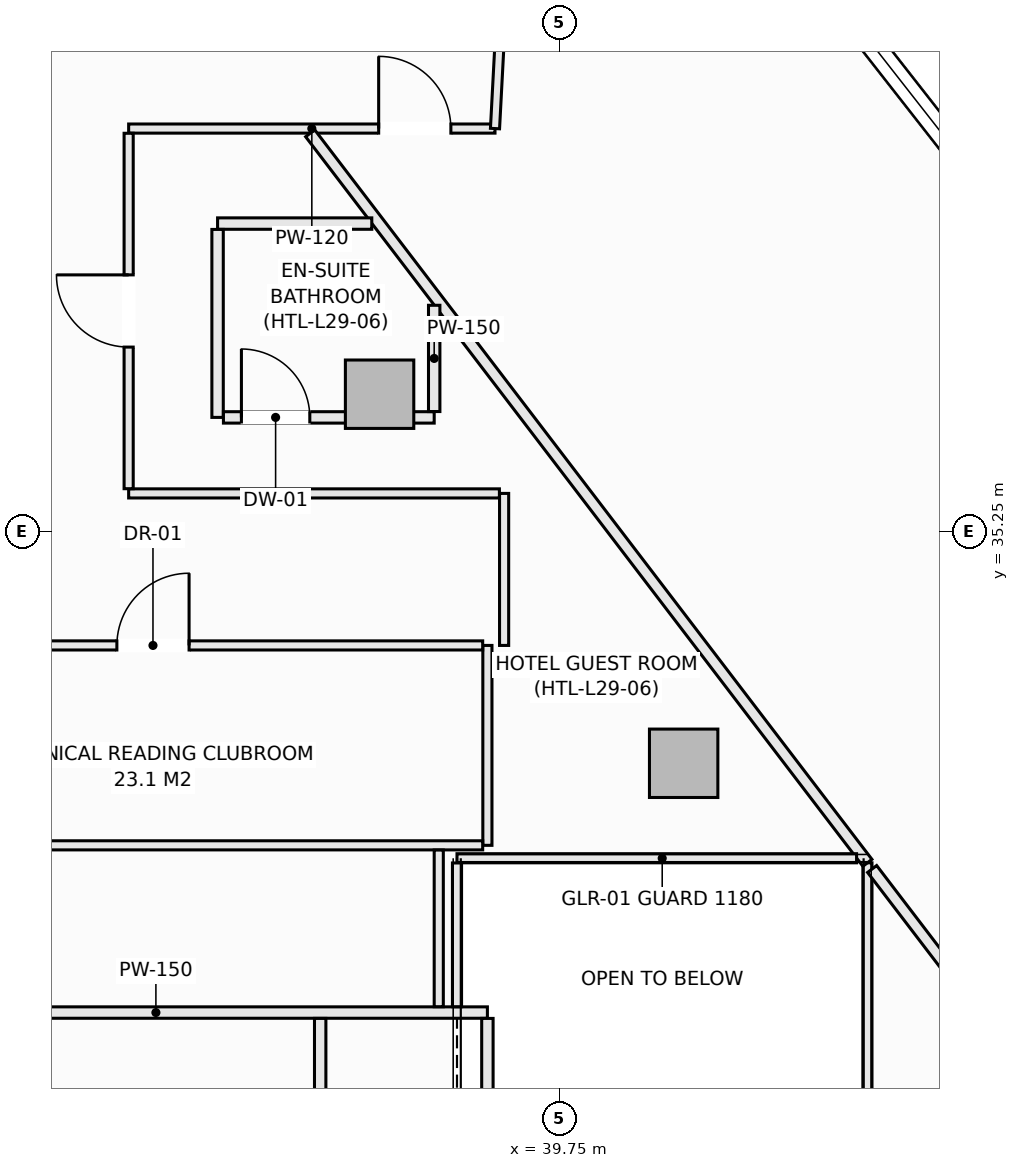
"""IFC4 building model, lengths in metres.
Left out: names, types, materials, properties, quantities, classifications, styles, units other than length and angle.
Written with IfcOpenShell. Run it as: python <this file> out.ifc"""

import sys

from ifc_helpers import new_model, si_unit, direction, frame, frame_2d, origin, origin_2d, place, context, subcontext, project, spatial, rectangle, extrude, element, fill, save


model = new_model("IFC4")
c1 = context("Model", 3, precision=1e-05, world=origin(), true_north=direction((0.0, 1.0)))
c2 = subcontext(c1, "Body", "Model", "MODEL_VIEW")
j1 = project(units=[si_unit("LENGTHUNIT", "METRE"), si_unit("PLANEANGLEUNIT", "RADIAN")], contexts=[c1])
p1 = place(None, origin())
s1 = spatial("IfcSite", under=j1, at=p1, CompositionType="ELEMENT")
p2 = place(p1, origin())
s2 = spatial("IfcBuilding", under=s1, at=p2, CompositionType="ELEMENT")
p3 = place(p2, frame((0.0, 0.0, 118.9)))
s3 = spatial("IfcBuildingStorey", under=s2, at=p3, CompositionType="ELEMENT", Elevation=118.9)
for number, where, z_axis, x_axis in (
    (1, (41.382, 32.199, -0.27), (0.0, 0.0, 1.0), (1.0, 0.0, 0.0)),
    (2, (37.382, 37.055, -0.27), (0.0, 0.0, 1.0), (1.0, 0.0, 0.0)),
):
    element("IfcColumn", number, at=place(p3, frame(where, z_axis=z_axis, x_axis=x_axis)), inside=s3, PredefinedType="COLUMN", context=c2, shape_type="SweptSolid", body=[
        extrude(rectangle(XDim=0.9, YDim=0.9, at=origin_2d()), origin(), (0.0, 0.0, 1.0), 3.4),
    ])
p4 = place(p3, frame((42.219, 43.758, 0.0), z_axis=(0.0, 0.0, 1.0), x_axis=(0.616435134162, -0.787405693001, 0.0)))
e3 = element("IfcWall", 3, at=p4, inside=s3, PredefinedType="SOLIDWALL", context=c2, shape_type="SweptSolid", body=[
    extrude(rectangle(XDim=5.759, YDim=0.3, at=frame_2d((2.879, 0.0))), origin(), (0.0, 0.0, 1.0), 2.653),
])
p5 = place(p4, frame((2.65, 0.0, 0.74)))
e4 = element("IfcOpeningElement", 4, at=p5, cuts=e3, PredefinedType="OPENING", context=c2, shape_type="SweptSolid", body=[
    extrude(rectangle(XDim=2.1, YDim=1.7, at=frame_2d((1.05, 0.85))), frame((0.0, 0.16, 0.0), z_axis=(0.0, -1.0, 0.0), x_axis=(1.0, 0.0, 0.0)), (0.0, 0.0, 1.0), 0.32),
])
p6 = place(p3, frame((30.077, 28.92, 0.0), z_axis=(0.0, 0.0, 1.0), x_axis=(1.0, 0.0, 0.0)))
e5 = element("IfcWall", 5, at=p6, inside=s3, PredefinedType="PARTITIONING", context=c2, shape_type="SweptSolid", body=[
    extrude(rectangle(XDim=8.723, YDim=0.15, at=frame_2d((4.362, 0.0))), origin(), (0.0, 0.0, 1.0), 3.13),
])
for number, where, z_axis, x_axis in (
    (6, (36.6, 25.197, 0.0), (0.0, 0.0, 1.0), (0.0, 1.0, 0.0)),
    (7, (38.8, 25.197, 0.0), (0.0, 0.0, 1.0), (0.0, 1.0, 0.0)),
):
    element("IfcWall", number, at=place(p3, frame(where, z_axis=z_axis, x_axis=x_axis)), inside=s3, PredefinedType="PARTITIONING", context=c2, shape_type="SweptSolid", body=[
        extrude(rectangle(XDim=3.646, YDim=0.15, at=frame_2d((1.823, 0.0))), origin(), (0.0, 0.0, 1.0), 3.13),
    ])
p7 = place(p3, frame((38.8, 31.12, 0.0), z_axis=(0.0, 0.0, 1.0), x_axis=(0.0, 1.0, 0.0)))
e8 = element("IfcWall", 8, at=p7, inside=s3, PredefinedType="PARTITIONING", context=c2, shape_type="SweptSolid", body=[
    extrude(rectangle(XDim=2.63, YDim=0.12, at=frame_2d((1.315, 0.0))), origin(), (0.0, 0.0, 1.0), 3.13),
])
p8 = place(p3, frame((30.062, 31.12, 0.0), z_axis=(0.0, 0.0, 1.0), x_axis=(1.0, 0.0, 0.0)))
e9 = element("IfcWall", 9, at=p8, inside=s3, PredefinedType="PARTITIONING", context=c2, shape_type="SweptSolid", body=[
    extrude(rectangle(XDim=8.676, YDim=0.12, at=frame_2d((4.338, 0.0))), origin(), (0.0, 0.0, 1.0), 3.13),
])
p9 = place(p3, frame((30.062, 33.75, 0.0), z_axis=(0.0, 0.0, 1.0), x_axis=(1.0, 0.0, 0.0)))
e10 = element("IfcWall", 10, at=p9, inside=s3, PredefinedType="PARTITIONING", context=c2, shape_type="SweptSolid", body=[
    extrude(rectangle(XDim=8.676, YDim=0.12, at=frame_2d((4.338, 0.0))), origin(), (0.0, 0.0, 1.0), 3.13),
])
p10 = place(p9, frame((3.863, 0.0, 0.0)))
e11 = element("IfcOpeningElement", 11, at=p10, cuts=e10, PredefinedType="OPENING", context=c2, shape_type="SweptSolid", body=[
    extrude(rectangle(XDim=0.95, YDim=2.1, at=frame_2d((0.475, 1.05))), frame((0.0, 0.07, 0.0), z_axis=(0.0, -1.0, 0.0), x_axis=(1.0, 0.0, 0.0)), (0.0, 0.0, 1.0), 0.14),
])
p11 = place(p3, frame((39.02, 33.75, 0.0), z_axis=(0.0, 0.0, 1.0), x_axis=(0.0, 1.0, 0.0)))
e12 = element("IfcWall", 12, at=p11, inside=s3, PredefinedType="PARTITIONING", context=c2, shape_type="SweptSolid", body=[
    extrude(rectangle(XDim=2.0, YDim=0.12, at=frame_2d((1.0, 0.0))), origin(), (0.0, 0.0, 1.0), 3.13),
])
p12 = place(p3, frame((34.08, 35.75, 0.0), z_axis=(0.0, 0.0, 1.0), x_axis=(1.0, 0.0, 0.0)))
e13 = element("IfcWall", 13, at=p12, inside=s3, PredefinedType="PARTITIONING", context=c2, shape_type="SweptSolid", body=[
    extrude(rectangle(XDim=4.878, YDim=0.12, at=frame_2d((2.439, 0.0))), origin(), (0.0, 0.0, 1.0), 2.505),
])
p13 = place(p3, frame((34.08, 40.55, 0.0), z_axis=(0.0, 0.0, 1.0), x_axis=(1.0, 0.0, 0.0)))
e14 = element("IfcWall", 14, at=p13, inside=s3, PredefinedType="PARTITIONING", context=c2, shape_type="SweptSolid", body=[
    extrude(rectangle(XDim=4.82, YDim=0.12, at=frame_2d((2.41, 0.0))), origin(), (0.0, 0.0, 1.0), 3.13),
])
p14 = place(p13, frame((3.29, 0.0, 0.0)))
e15 = element("IfcOpeningElement", 15, at=p14, cuts=e14, PredefinedType="OPENING", context=c2, shape_type="SweptSolid", body=[
    extrude(rectangle(XDim=0.95, YDim=2.1, at=frame_2d((0.475, 1.05))), frame((0.0, 0.07, 0.0), z_axis=(0.0, -1.0, 0.0), x_axis=(1.0, 0.0, 0.0)), (0.0, 0.0, 1.0), 0.14),
])
p15 = place(p3, frame((38.9, 40.55, 0.0), z_axis=(0.0, 0.0, 1.0), x_axis=(0.052851358225, 0.99860239031, 0.0)))
e16 = element("IfcWall", 16, at=p15, inside=s3, PredefinedType="PARTITIONING", context=c2, shape_type="SweptSolid", body=[
    extrude(rectangle(XDim=1.27, YDim=0.12, at=frame_2d((0.635, 0.0))), origin(), (0.0, 0.0, 1.0), 3.13),
])
p16 = place(p3, frame((34.08, 35.812, 0.0), z_axis=(0.0, 0.0, 1.0), x_axis=(0.0, 1.0, 0.0)))
e17 = element("IfcWall", 17, at=p16, inside=s3, PredefinedType="PARTITIONING", context=c2, shape_type="SweptSolid", body=[
    extrude(rectangle(XDim=4.676, YDim=0.12, at=frame_2d((2.338, 0.0))), origin(), (0.0, 0.0, 1.0), 2.812),
])
p17 = place(p16, frame((1.863, 0.0, 0.0)))
e18 = element("IfcOpeningElement", 18, at=p17, cuts=e17, PredefinedType="OPENING", context=c2, shape_type="SweptSolid", body=[
    extrude(rectangle(XDim=0.95, YDim=2.1, at=frame_2d((0.475, 1.05))), frame((0.0, 0.07, 0.0), z_axis=(0.0, -1.0, 0.0), x_axis=(1.0, 0.0, 0.0)), (0.0, 0.0, 1.0), 0.14),
])
p18 = place(p3, frame((38.16, 28.997, 0.0), z_axis=(0.0, 0.0, 1.0), x_axis=(0.0, 1.0, 0.0)))
e19 = element("IfcWall", 19, at=p18, inside=s3, PredefinedType="PARTITIONING", context=c2, shape_type="SweptSolid", body=[
    extrude(rectangle(XDim=2.061, YDim=0.12, at=frame_2d((1.031, 0.0))), origin(), (0.0, 0.0, 1.0), 3.13),
])
p19 = place(p3, frame((43.8, 27.812, 0.0), z_axis=(0.0, 0.0, 1.0), x_axis=(0.0, 1.0, 0.0)))
e20 = element("IfcWall", 20, at=p19, inside=s3, PredefinedType="PARTITIONING", context=c2, shape_type="SweptSolid", body=[
    extrude(rectangle(XDim=3.078, YDim=0.12, at=frame_2d((1.539, 0.0))), origin(), (0.0, 0.0, 1.0), 3.13),
])
p20 = place(p3, frame((36.468, 40.488, 0.0), z_axis=(0.0, 0.0, 1.0), x_axis=(0.607033615812, -0.794676153709, 0.0)))
e21 = element("IfcWall", 21, at=p20, inside=s3, PredefinedType="PARTITIONING", context=c2, shape_type="SweptSolid", body=[
    extrude(rectangle(XDim=12.078, YDim=0.15, at=frame_2d((6.039, 0.0))), origin(), (0.0, 0.0, 1.0), 3.13),
])
p21 = place(p3, frame((43.862, 30.809, 0.0), z_axis=(0.0, 0.0, 1.0), x_axis=(0.607045175038, -0.794667323767, 0.0)))
e22 = element("IfcWall", 22, at=p21, inside=s3, PredefinedType="PARTITIONING", context=c2, shape_type="SweptSolid", body=[
    extrude(rectangle(XDim=13.766, YDim=0.15, at=frame_2d((6.883, 0.0))), origin(), (0.0, 0.0, 1.0), 3.13),
])
p22 = place(p3, frame((35.25, 39.3, 0.0), z_axis=(0.0, 0.0, 1.0), x_axis=(1.0, 0.0, 0.0)))
e23 = element("IfcWall", 23, at=p22, inside=s3, PredefinedType="PARTITIONING", context=c2, shape_type="SweptSolid", body=[
    extrude(rectangle(XDim=2.029, YDim=0.15, at=frame_2d((1.014, 0.0))), origin(), (0.0, 0.0, 1.0), 3.13),
])
p23 = place(p3, frame((35.25, 36.75, 0.0), z_axis=(0.0, 0.0, 1.0), x_axis=(0.0, 1.0, 0.0)))
e24 = element("IfcWall", 24, at=p23, inside=s3, PredefinedType="PARTITIONING", context=c2, shape_type="SweptSolid", body=[
    extrude(rectangle(XDim=2.473, YDim=0.15, at=frame_2d((1.236, 0.0))), origin(), (0.0, 0.0, 1.0), 3.13),
])
p24 = place(p3, frame((35.327, 36.75, 0.0), z_axis=(0.0, 0.0, 1.0), x_axis=(1.0, 0.0, 0.0)))
e25 = element("IfcWall", 25, at=p24, inside=s3, PredefinedType="PARTITIONING", context=c2, shape_type="SweptSolid", body=[
    extrude(rectangle(XDim=2.773, YDim=0.15, at=frame_2d((1.387, 0.0))), origin(), (0.0, 0.0, 1.0), 2.505),
])
p25 = place(p24, frame((0.237, 0.0, 0.0)))
e26 = element("IfcOpeningElement", 26, at=p25, cuts=e25, PredefinedType="OPENING", context=c2, shape_type="SweptSolid", body=[
    extrude(rectangle(XDim=0.9, YDim=2.1, at=frame_2d((0.45, 1.05))), frame((0.0, 0.085, 0.0), z_axis=(0.0, -1.0, 0.0), x_axis=(1.0, 0.0, 0.0)), (0.0, 0.0, 1.0), 0.17),
])
p26 = place(p3, frame((38.1, 36.827, 0.0), z_axis=(0.0, 0.0, 1.0), x_axis=(0.0, 1.0, 0.0)))
e27 = element("IfcWall", 27, at=p26, inside=s3, PredefinedType="PARTITIONING", context=c2, shape_type="SweptSolid", body=[
    extrude(rectangle(XDim=1.398, YDim=0.15, at=frame_2d((0.699, 0.0))), origin(), (0.0, 0.0, 1.0), 2.505),
])
p27 = place(p3, frame((38.4, 30.95, 0.0), z_axis=(0.0, 0.0, 1.0), x_axis=(1.0, 0.0, 0.0)))
e28 = element("IfcWall", 28, at=p27, inside=s3, PredefinedType="PARTITIONING", context=c2, shape_type="SweptSolid", body=[
    extrude(rectangle(XDim=5.257, YDim=0.12, at=frame_2d((2.629, 0.0))), origin(), (0.0, 0.0, 1.0), 3.13),
])
p28 = place(p3, frame((38.4, 28.997, 0.0), z_axis=(0.0, 0.0, 1.0), x_axis=(0.0, 1.0, 0.0)))
e29 = element("IfcWall", 29, at=p28, inside=s3, PredefinedType="PARTITIONING", context=c2, shape_type="SweptSolid", body=[
    extrude(rectangle(XDim=1.891, YDim=0.12, at=frame_2d((0.945, 0.0))), origin(), (0.0, 0.0, 1.0), 3.13),
])
p29 = place(p5, origin())
e30 = element("IfcWindow", 30, at=p29, inside=s3, PartitioningType="SINGLE_PANEL", PredefinedType="WINDOW", context=c2, shape_type="SweptSolid", body=[
    extrude(rectangle(XDim=2.1, YDim=1.7, at=frame_2d((1.05, 0.85))), frame((0.0, 0.03, 0.0), z_axis=(0.0, -1.0, 0.0), x_axis=(1.0, 0.0, 0.0)), (0.0, 0.0, 1.0), 0.06),
])
fill(e4, e30)
p30 = place(p10, origin())
e31 = element("IfcDoor", 31, at=p30, inside=s3, OperationType="SINGLE_SWING_RIGHT", PredefinedType="DOOR", context=c2, shape_type="SweptSolid", body=[
    extrude(rectangle(XDim=0.95, YDim=2.1, at=frame_2d((0.475, 1.05))), frame((0.0, 0.025, 0.0), z_axis=(0.0, -1.0, 0.0), x_axis=(1.0, 0.0, 0.0)), (0.0, 0.0, 1.0), 0.05),
])
fill(e11, e31)
p31 = place(p14, origin())
e32 = element("IfcDoor", 32, at=p31, inside=s3, OperationType="SINGLE_SWING_LEFT", PredefinedType="DOOR", context=c2, shape_type="SweptSolid", body=[
    extrude(rectangle(XDim=0.95, YDim=2.1, at=frame_2d((0.475, 1.05))), frame((0.0, 0.025, 0.0), z_axis=(0.0, -1.0, 0.0), x_axis=(1.0, 0.0, 0.0)), (0.0, 0.0, 1.0), 0.05),
])
fill(e15, e32)
p32 = place(p17, origin())
e33 = element("IfcDoor", 33, at=p32, inside=s3, OperationType="SINGLE_SWING_RIGHT", PredefinedType="DOOR", context=c2, shape_type="SweptSolid", body=[
    extrude(rectangle(XDim=0.95, YDim=2.1, at=frame_2d((0.475, 1.05))), frame((0.0, 0.025, 0.0), z_axis=(0.0, -1.0, 0.0), x_axis=(1.0, 0.0, 0.0)), (0.0, 0.0, 1.0), 0.05),
])
fill(e18, e33)
p33 = place(p25, origin())
e34 = element("IfcDoor", 34, at=p33, inside=s3, OperationType="SINGLE_SWING_LEFT", PredefinedType="DOOR", context=c2, shape_type="SweptSolid", body=[
    extrude(rectangle(XDim=0.9, YDim=2.1, at=frame_2d((0.45, 1.05))), frame((0.0, 0.025, 0.0), z_axis=(0.0, -1.0, 0.0), x_axis=(1.0, 0.0, 0.0)), (0.0, 0.0, 1.0), 0.05),
])
fill(e26, e34)
save(model, sys.argv[1])
